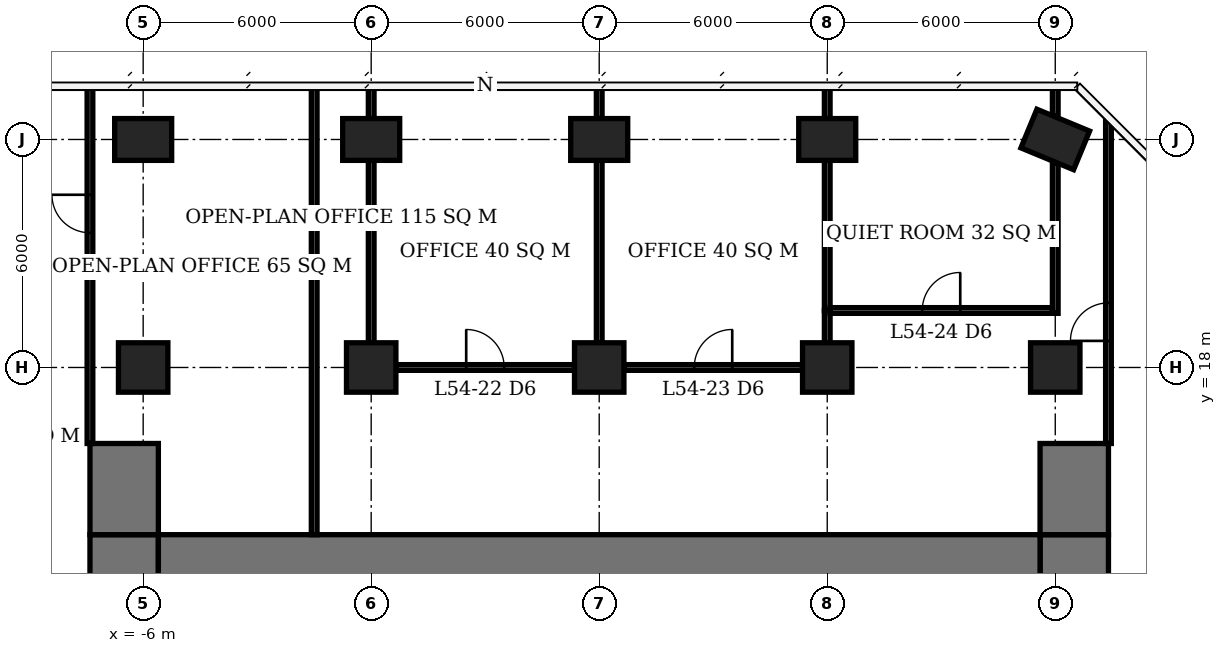
"""IFC4 building model, lengths in metres.
Left out: names, types, materials, properties, quantities, classifications, styles, units other than length and angle.
Written with IfcOpenShell. Run it as: python <this file> out.ifc"""

import sys

from ifc_helpers import new_model, si_unit, direction, frame, frame_2d, origin, origin_2d, place, context, subcontext, project, spatial, rectangle, extrude, element, fill, save


model = new_model("IFC4")
c1 = context("Model", 3, precision=1e-05, world=origin(), true_north=direction((0.0, 1.0)))
c2 = subcontext(c1, "Body", "Model", "MODEL_VIEW")
j1 = project(units=[si_unit("LENGTHUNIT", "METRE"), si_unit("PLANEANGLEUNIT", "RADIAN")], contexts=[c1])
p1 = place(None, origin())
s1 = spatial("IfcSite", under=j1, at=p1, CompositionType="ELEMENT")
p2 = place(p1, origin())
s2 = spatial("IfcBuilding", under=s1, at=p2, CompositionType="ELEMENT")
p3 = place(p2, frame((0.0, 0.0, 220.1)))
s3 = spatial("IfcBuildingStorey", under=s2, at=p3, CompositionType="ELEMENT", Elevation=220.1)
p4 = place(p3, frame((-6.0, 18.0, 0.0), z_axis=(0.0, 0.0, 1.0), x_axis=(1.0, 0.0, 0.0)))
e1 = element("IfcColumn", 1, at=p4, inside=s3, PredefinedType="COLUMN", context=c2, shape_type="SweptSolid", body=[
    extrude(rectangle(XDim=1.3, YDim=1.3, at=origin_2d()), origin(), (0.0, 0.0, 1.0), 3.9),
])
p5 = place(p3, frame((-6.0, 24.0, 0.0), z_axis=(0.0, 0.0, 1.0), x_axis=(1.0, 0.0, 0.0)))
e2 = element("IfcColumn", 2, at=p5, inside=s3, PredefinedType="COLUMN", context=c2, shape_type="SweptSolid", body=[
    extrude(rectangle(XDim=1.5, YDim=1.1, at=origin_2d()), origin(), (0.0, 0.0, 1.0), 3.9),
])
p6 = place(p3, frame((0.0, 18.0, 0.0), z_axis=(0.0, 0.0, 1.0), x_axis=(1.0, 0.0, 0.0)))
e3 = element("IfcColumn", 3, at=p6, inside=s3, PredefinedType="COLUMN", context=c2, shape_type="SweptSolid", body=[
    extrude(rectangle(XDim=1.3, YDim=1.3, at=origin_2d()), origin(), (0.0, 0.0, 1.0), 3.9),
])
p7 = place(p3, frame((0.0, 24.0, 0.0), z_axis=(0.0, 0.0, 1.0), x_axis=(1.0, 0.0, 0.0)))
e4 = element("IfcColumn", 4, at=p7, inside=s3, PredefinedType="COLUMN", context=c2, shape_type="SweptSolid", body=[
    extrude(rectangle(XDim=1.5, YDim=1.1, at=origin_2d()), origin(), (0.0, 0.0, 1.0), 3.9),
])
p8 = place(p3, frame((6.0, 18.0, 0.0), z_axis=(0.0, 0.0, 1.0), x_axis=(1.0, 0.0, 0.0)))
e5 = element("IfcColumn", 5, at=p8, inside=s3, PredefinedType="COLUMN", context=c2, shape_type="SweptSolid", body=[
    extrude(rectangle(XDim=1.3, YDim=1.3, at=origin_2d()), origin(), (0.0, 0.0, 1.0), 3.9),
])
p9 = place(p3, frame((6.0, 24.0, 0.0), z_axis=(0.0, 0.0, 1.0), x_axis=(1.0, 0.0, 0.0)))
e6 = element("IfcColumn", 6, at=p9, inside=s3, PredefinedType="COLUMN", context=c2, shape_type="SweptSolid", body=[
    extrude(rectangle(XDim=1.5, YDim=1.1, at=origin_2d()), origin(), (0.0, 0.0, 1.0), 3.9),
])
p10 = place(p3, frame((12.0, 18.0, 0.0), z_axis=(0.0, 0.0, 1.0), x_axis=(1.0, 0.0, 0.0)))
e7 = element("IfcColumn", 7, at=p10, inside=s3, PredefinedType="COLUMN", context=c2, shape_type="SweptSolid", body=[
    extrude(rectangle(XDim=1.3, YDim=1.3, at=origin_2d()), origin(), (0.0, 0.0, 1.0), 3.9),
])
p11 = place(p3, frame((12.0, 24.0, 0.0), z_axis=(0.0, 0.0, 1.0), x_axis=(1.0, 0.0, 0.0)))
e8 = element("IfcColumn", 8, at=p11, inside=s3, PredefinedType="COLUMN", context=c2, shape_type="SweptSolid", body=[
    extrude(rectangle(XDim=1.5, YDim=1.1, at=origin_2d()), origin(), (0.0, 0.0, 1.0), 3.9),
])
p12 = place(p3, frame((18.0, 18.0, 0.0), z_axis=(0.0, 0.0, 1.0), x_axis=(1.0, 0.0, 0.0)))
e9 = element("IfcColumn", 9, at=p12, inside=s3, PredefinedType="COLUMN", context=c2, shape_type="SweptSolid", body=[
    extrude(rectangle(XDim=1.3, YDim=1.3, at=origin_2d()), origin(), (0.0, 0.0, 1.0), 3.9),
])
p13 = place(p3, frame((18.0, 24.0, 0.0), z_axis=(0.0, 0.0, 1.0), x_axis=(0.923879532511, -0.382683432365, 0.0)))
e10 = element("IfcColumn", 10, at=p13, inside=s3, PredefinedType="COLUMN", context=c2, shape_type="SweptSolid", body=[
    extrude(rectangle(XDim=1.5, YDim=1.1, at=origin_2d()), origin(), (0.0, 0.0, 1.0), 3.9),
])
p14 = place(p3, frame((-5.6, 12.6, 0.0), z_axis=(0.0, 0.0, 1.0), x_axis=(1.0, 0.0, 0.0)))
e11 = element("IfcWall", 11, at=p14, inside=s3, PredefinedType="SHEAR", context=c2, shape_type="SweptSolid", body=[
    extrude(rectangle(XDim=23.2, YDim=2.0, at=frame_2d((11.6, 0.0))), origin(), (0.0, 0.0, 1.0), 3.9),
])
p15 = place(p3, frame((-6.5, -7.6, 0.0), z_axis=(0.0, 0.0, 1.0), x_axis=(0.0, 1.0, 0.0)))
e12 = element("IfcWall", 12, at=p15, inside=s3, PredefinedType="SHEAR", context=c2, shape_type="SweptSolid", body=[
    extrude(rectangle(XDim=21.2, YDim=1.8, at=frame_2d((10.6, 0.0))), origin(), (0.0, 0.0, 1.0), 3.9),
])
p16 = place(p15, frame((7.8, 0.0, 0.0)))
e13 = element("IfcOpeningElement", 13, at=p16, cuts=e12, PredefinedType="OPENING", context=c2, shape_type="SweptSolid", body=[
    extrude(rectangle(XDim=1.8, YDim=2.4, at=frame_2d((0.9, 1.2))), frame((0.0, 0.91, 0.0), z_axis=(0.0, -1.0, 0.0), x_axis=(1.0, 0.0, 0.0)), (0.0, 0.0, 1.0), 1.82),
])
p17 = place(p3, frame((18.5, -7.6, 0.0), z_axis=(0.0, 0.0, 1.0), x_axis=(0.0, 1.0, 0.0)))
e14 = element("IfcWall", 14, at=p17, inside=s3, PredefinedType="SHEAR", context=c2, shape_type="SweptSolid", body=[
    extrude(rectangle(XDim=21.2, YDim=1.8, at=frame_2d((10.6, 0.0))), origin(), (0.0, 0.0, 1.0), 3.9),
])
p18 = place(p17, frame((9.2, 0.0, 0.0)))
e15 = element("IfcOpeningElement", 15, at=p18, cuts=e14, PredefinedType="OPENING", context=c2, shape_type="SweptSolid", body=[
    extrude(rectangle(XDim=1.8, YDim=2.4, at=frame_2d((0.9, 1.2))), frame((0.0, 0.91, 0.0), z_axis=(0.0, -1.0, 0.0), x_axis=(1.0, 0.0, 0.0)), (0.0, 0.0, 1.0), 1.82),
])
for number, where, z_axis, x_axis in (
    (16, (-6.5, 13.6, 0.0), (0.0, 0.0, 1.0), (0.0, 1.0, 0.0)),
    (17, (18.5, 13.6, 0.0), (0.0, 0.0, 1.0), (0.0, 1.0, 0.0)),
):
    element("IfcWall", number, at=place(p3, frame(where, z_axis=z_axis, x_axis=x_axis)), inside=s3, PredefinedType="SHEAR", context=c2, shape_type="SweptSolid", body=[
        extrude(rectangle(XDim=2.4, YDim=1.8, at=frame_2d((1.2, 0.0))), origin(), (0.0, 0.0, 1.0), 3.9),
    ])
p19 = place(p3, frame((0.65, 18.0, 0.0), z_axis=(0.0, 0.0, 1.0), x_axis=(1.0, 0.0, 0.0)))
e18 = element("IfcWall", 18, at=p19, inside=s3, PredefinedType="PARTITIONING", context=c2, shape_type="SweptSolid", body=[
    extrude(rectangle(XDim=4.7, YDim=0.15, at=frame_2d((2.35, 0.0))), origin(), (0.0, 0.0, 1.0), 3.65),
])
p20 = place(p19, frame((1.85, 0.0, 0.0)))
e19 = element("IfcOpeningElement", 19, at=p20, cuts=e18, PredefinedType="OPENING", context=c2, shape_type="SweptSolid", body=[
    extrude(rectangle(XDim=1.0, YDim=2.1, at=frame_2d((0.5, 1.05))), frame((0.0, 0.085, 0.0), z_axis=(0.0, -1.0, 0.0), x_axis=(1.0, 0.0, 0.0)), (0.0, 0.0, 1.0), 0.17),
])
p21 = place(p3, frame((6.65, 18.0, 0.0), z_axis=(0.0, 0.0, 1.0), x_axis=(1.0, 0.0, 0.0)))
e20 = element("IfcWall", 20, at=p21, inside=s3, PredefinedType="PARTITIONING", context=c2, shape_type="SweptSolid", body=[
    extrude(rectangle(XDim=4.7, YDim=0.15, at=frame_2d((2.35, 0.0))), origin(), (0.0, 0.0, 1.0), 3.65),
])
p22 = place(p21, frame((1.85, 0.0, 0.0)))
e21 = element("IfcOpeningElement", 21, at=p22, cuts=e20, PredefinedType="OPENING", context=c2, shape_type="SweptSolid", body=[
    extrude(rectangle(XDim=1.0, YDim=2.1, at=frame_2d((0.5, 1.05))), frame((0.0, 0.085, 0.0), z_axis=(0.0, -1.0, 0.0), x_axis=(1.0, 0.0, 0.0)), (0.0, 0.0, 1.0), 0.17),
])
p23 = place(p3, frame((12.075, 19.5, 0.0), z_axis=(0.0, 0.0, 1.0), x_axis=(1.0, 0.0, 0.0)))
e22 = element("IfcWall", 22, at=p23, inside=s3, PredefinedType="PARTITIONING", context=c2, shape_type="SweptSolid", body=[
    extrude(rectangle(XDim=5.85, YDim=0.15, at=frame_2d((2.925, 0.0))), origin(), (0.0, 0.0, 1.0), 3.65),
])
p24 = place(p23, frame((2.425, 0.0, 0.0)))
e23 = element("IfcOpeningElement", 23, at=p24, cuts=e22, PredefinedType="OPENING", context=c2, shape_type="SweptSolid", body=[
    extrude(rectangle(XDim=1.0, YDim=2.1, at=frame_2d((0.5, 1.05))), frame((0.0, 0.085, 0.0), z_axis=(0.0, -1.0, 0.0), x_axis=(1.0, 0.0, 0.0)), (0.0, 0.0, 1.0), 0.17),
])
p25 = place(p3, frame((0.0, 18.65, 0.0), z_axis=(0.0, 0.0, 1.0), x_axis=(0.0, 1.0, 0.0)))
e24 = element("IfcWall", 24, at=p25, inside=s3, PredefinedType="PARTITIONING", context=c2, shape_type="SweptSolid", body=[
    extrude(rectangle(XDim=4.8, YDim=0.15, at=frame_2d((2.4, 0.0))), origin(), (0.0, 0.0, 1.0), 3.65),
])
p26 = place(p3, frame((0.0, 24.55, 0.0), z_axis=(0.0, 0.0, 1.0), x_axis=(0.0, 1.0, 0.0)))
e25 = element("IfcWall", 25, at=p26, inside=s3, PredefinedType="PARTITIONING", context=c2, shape_type="SweptSolid", body=[
    extrude(rectangle(XDim=0.8, YDim=0.15, at=frame_2d((0.4, 0.0))), origin(), (0.0, 0.0, 1.0), 3.65),
])
p27 = place(p3, frame((6.0, 18.65, 0.0), z_axis=(0.0, 0.0, 1.0), x_axis=(0.0, 1.0, 0.0)))
e26 = element("IfcWall", 26, at=p27, inside=s3, PredefinedType="PARTITIONING", context=c2, shape_type="SweptSolid", body=[
    extrude(rectangle(XDim=4.8, YDim=0.15, at=frame_2d((2.4, 0.0))), origin(), (0.0, 0.0, 1.0), 3.65),
])
p28 = place(p3, frame((6.0, 24.55, 0.0), z_axis=(0.0, 0.0, 1.0), x_axis=(0.0, 1.0, 0.0)))
e27 = element("IfcWall", 27, at=p28, inside=s3, PredefinedType="PARTITIONING", context=c2, shape_type="SweptSolid", body=[
    extrude(rectangle(XDim=0.8, YDim=0.15, at=frame_2d((0.4, 0.0))), origin(), (0.0, 0.0, 1.0), 3.65),
])
p29 = place(p3, frame((12.0, 18.65, 0.0), z_axis=(0.0, 0.0, 1.0), x_axis=(0.0, 1.0, 0.0)))
e28 = element("IfcWall", 28, at=p29, inside=s3, PredefinedType="PARTITIONING", context=c2, shape_type="SweptSolid", body=[
    extrude(rectangle(XDim=0.85, YDim=0.15, at=frame_2d((0.425, 0.0))), origin(), (0.0, 0.0, 1.0), 3.65),
])
p30 = place(p3, frame((12.0, 19.5, 0.0), z_axis=(0.0, 0.0, 1.0), x_axis=(0.0, 1.0, 0.0)))
e29 = element("IfcWall", 29, at=p30, inside=s3, PredefinedType="PARTITIONING", context=c2, shape_type="SweptSolid", body=[
    extrude(rectangle(XDim=3.95, YDim=0.15, at=frame_2d((1.975, 0.0))), origin(), (0.0, 0.0, 1.0), 3.65),
])
p31 = place(p3, frame((12.0, 24.55, 0.0), z_axis=(0.0, 0.0, 1.0), x_axis=(0.0, 1.0, 0.0)))
e30 = element("IfcWall", 30, at=p31, inside=s3, PredefinedType="PARTITIONING", context=c2, shape_type="SweptSolid", body=[
    extrude(rectangle(XDim=0.85, YDim=0.15, at=frame_2d((0.425, 0.0))), origin(), (0.0, 0.0, 1.0), 3.65),
])
p32 = place(p3, frame((18.0, 19.425, 0.0), z_axis=(0.0, 0.0, 1.0), x_axis=(0.0, 1.0, 0.0)))
e31 = element("IfcWall", 31, at=p32, inside=s3, PredefinedType="PARTITIONING", context=c2, shape_type="SweptSolid", body=[
    extrude(rectangle(XDim=3.948, YDim=0.15, at=frame_2d((1.974, 0.0))), origin(), (0.0, 0.0, 1.0), 3.65),
])
p33 = place(p3, frame((18.0, 24.626, 0.0), z_axis=(0.0, 0.0, 1.0), x_axis=(0.0, 1.0, 0.0)))
e32 = element("IfcWall", 32, at=p33, inside=s3, PredefinedType="PARTITIONING", context=c2, shape_type="SweptSolid", body=[
    extrude(rectangle(XDim=0.773, YDim=0.15, at=frame_2d((0.387, 0.0))), origin(), (0.0, 0.0, 1.0), 3.65),
])
p34 = place(p3, frame((-7.4, 16.0, 0.0), z_axis=(0.0, 0.0, 1.0), x_axis=(0.0, 1.0, 0.0)))
e33 = element("IfcWall", 33, at=p34, inside=s3, PredefinedType="PARTITIONING", context=c2, shape_type="SweptSolid", body=[
    extrude(rectangle(XDim=9.4, YDim=0.15, at=frame_2d((4.7, 0.0))), origin(), (0.0, 0.0, 1.0), 3.65),
])
p35 = place(p34, frame((5.545, 0.0, 0.0)))
e34 = element("IfcOpeningElement", 34, at=p35, cuts=e33, PredefinedType="OPENING", context=c2, shape_type="SweptSolid", body=[
    extrude(rectangle(XDim=1.0, YDim=2.1, at=frame_2d((0.5, 1.05))), frame((0.0, 0.085, 0.0), z_axis=(0.0, -1.0, 0.0), x_axis=(1.0, 0.0, 0.0)), (0.0, 0.0, 1.0), 0.17),
])
p36 = place(p3, frame((-1.5, 13.6, 0.0), z_axis=(0.0, 0.0, 1.0), x_axis=(0.0, 1.0, 0.0)))
e35 = element("IfcWall", 35, at=p36, inside=s3, PredefinedType="PARTITIONING", context=c2, shape_type="SweptSolid", body=[
    extrude(rectangle(XDim=11.8, YDim=0.15, at=frame_2d((5.9, 0.0))), origin(), (0.0, 0.0, 1.0), 3.65),
])
p37 = place(p3, frame((19.4, 16.0, 0.0), z_axis=(0.0, 0.0, 1.0), x_axis=(0.0, 1.0, 0.0)))
e36 = element("IfcWall", 36, at=p37, inside=s3, PredefinedType="PARTITIONING", context=c2, shape_type="SweptSolid", body=[
    extrude(rectangle(XDim=8.489, YDim=0.15, at=frame_2d((4.245, 0.0))), origin(), (0.0, 0.0, 1.0), 3.65),
])
p38 = place(p37, frame((2.7, 0.0, 0.0)))
e37 = element("IfcOpeningElement", 37, at=p38, cuts=e36, PredefinedType="OPENING", context=c2, shape_type="SweptSolid", body=[
    extrude(rectangle(XDim=1.0, YDim=2.1, at=frame_2d((0.5, 1.05))), frame((0.0, 0.085, 0.0), z_axis=(0.0, -1.0, 0.0), x_axis=(1.0, 0.0, 0.0)), (0.0, 0.0, 1.0), 0.17),
])
p39 = place(p20, origin())
e38 = element("IfcDoor", 38, at=p39, inside=s3, OperationType="SINGLE_SWING_LEFT", PredefinedType="DOOR", context=c2, shape_type="SweptSolid", body=[
    extrude(rectangle(XDim=1.0, YDim=2.1, at=frame_2d((0.5, 1.05))), frame((0.0, 0.025, 0.0), z_axis=(0.0, -1.0, 0.0), x_axis=(1.0, 0.0, 0.0)), (0.0, 0.0, 1.0), 0.05),
])
fill(e19, e38)
p40 = place(p22, origin())
e39 = element("IfcDoor", 39, at=p40, inside=s3, OperationType="SINGLE_SWING_RIGHT", PredefinedType="DOOR", context=c2, shape_type="SweptSolid", body=[
    extrude(rectangle(XDim=1.0, YDim=2.1, at=frame_2d((0.5, 1.05))), frame((0.0, 0.025, 0.0), z_axis=(0.0, -1.0, 0.0), x_axis=(1.0, 0.0, 0.0)), (0.0, 0.0, 1.0), 0.05),
])
fill(e21, e39)
p41 = place(p24, origin())
e40 = element("IfcDoor", 40, at=p41, inside=s3, OperationType="SINGLE_SWING_RIGHT", PredefinedType="DOOR", context=c2, shape_type="SweptSolid", body=[
    extrude(rectangle(XDim=1.0, YDim=2.1, at=frame_2d((0.5, 1.05))), frame((0.0, 0.025, 0.0), z_axis=(0.0, -1.0, 0.0), x_axis=(1.0, 0.0, 0.0)), (0.0, 0.0, 1.0), 0.05),
])
fill(e23, e40)
p42 = place(p38, origin())
e41 = element("IfcDoor", 41, at=p42, inside=s3, OperationType="SINGLE_SWING_LEFT", PredefinedType="DOOR", context=c2, shape_type="SweptSolid", body=[
    extrude(rectangle(XDim=1.0, YDim=2.1, at=frame_2d((0.5, 1.05))), frame((0.0, 0.025, 0.0), z_axis=(0.0, -1.0, 0.0), x_axis=(1.0, 0.0, 0.0)), (0.0, 0.0, 1.0), 0.05),
])
fill(e37, e41)
p43 = place(p35, origin())
e42 = element("IfcDoor", 42, at=p43, inside=s3, OperationType="SINGLE_SWING_RIGHT", PredefinedType="DOOR", context=c2, shape_type="SweptSolid", body=[
    extrude(rectangle(XDim=1.0, YDim=2.1, at=frame_2d((0.5, 1.05))), frame((0.0, 0.025, 0.0), z_axis=(0.0, -1.0, 0.0), x_axis=(1.0, 0.0, 0.0)), (0.0, 0.0, 1.0), 0.05),
])
fill(e34, e42)
save(model, sys.argv[1])
